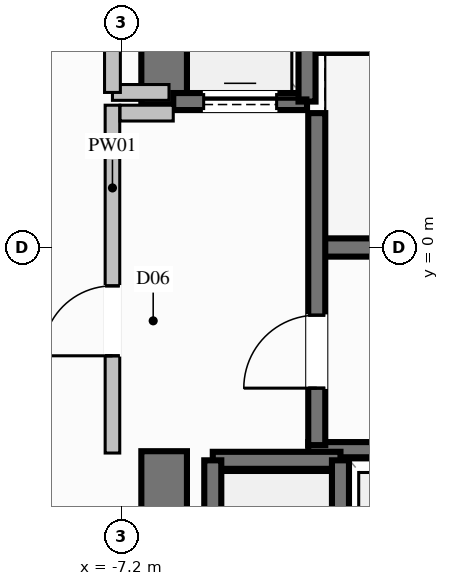
"""IFC4 building model, lengths in metres.
Left out: names, types, materials, properties, quantities, classifications, styles, units other than length and angle.
Written with IfcOpenShell. Run it as: python <this file> out.ifc"""

import sys

from ifc_helpers import new_model, si_unit, direction, frame, frame_2d, origin, place, context, subcontext, project, spatial, rectangle, extrude, element, fill, save


model = new_model("IFC4")
c1 = context("Model", 3, precision=1e-05, world=origin(), true_north=direction((0.0, 1.0)))
c2 = subcontext(c1, "Body", "Model", "MODEL_VIEW")
j1 = project(units=[si_unit("LENGTHUNIT", "METRE"), si_unit("PLANEANGLEUNIT", "RADIAN")], contexts=[c1])
p1 = place(None, origin())
s1 = spatial("IfcSite", under=j1, at=p1, CompositionType="ELEMENT")
p2 = place(p1, origin())
s2 = spatial("IfcBuilding", under=s1, at=p2, CompositionType="ELEMENT")
p3 = place(p2, frame((0.0, 0.0, 75.2)))
s3 = spatial("IfcBuildingStorey", under=s2, at=p3, CompositionType="ELEMENT", Elevation=75.2)
p4 = place(p3, frame((-3.99, 0.0, 0.0), z_axis=(0.0, 0.0, 1.0), x_axis=(1.0, 0.0, 0.0)))
e1 = element("IfcWall", 1, at=p4, inside=s3, PredefinedType="SHEAR", context=c2, shape_type="SweptSolid", body=[
    extrude(rectangle(XDim=7.98, YDim=0.3, at=frame_2d((3.99, 0.0))), origin(), (0.0, 0.0, 1.0), 3.6),
])
for number, where, z_axis, x_axis in (
    (2, (-4.13, -3.325, 0.0), (0.0, 0.0, 1.0), (1.0, 0.0, 0.0)),
    (3, (-4.13, 3.325, 0.0), (0.0, 0.0, 1.0), (1.0, 0.0, 0.0)),
):
    element("IfcWall", number, at=place(p3, frame(where, z_axis=z_axis, x_axis=x_axis)), inside=s3, PredefinedType="SOLIDWALL", context=c2, shape_type="SweptSolid", body=[
        extrude(rectangle(XDim=8.26, YDim=0.25, at=frame_2d((4.13, 0.0))), origin(), (0.0, 0.0, 1.0), 3.6),
    ])
p5 = place(p3, frame((-6.5, 2.35, 0.0), z_axis=(0.0, 0.0, 1.0), x_axis=(0.0, 1.0, 0.0)))
e4 = element("IfcWall", 4, at=p5, inside=s3, PredefinedType="SHEAR", context=c2, shape_type="SweptSolid", body=[
    extrude(rectangle(XDim=4.125, YDim=0.75, at=frame_2d((2.062, 0.0))), origin(), (0.0, 0.0, 1.0), 3.6),
])
p6 = place(p3, frame((-6.5, -6.475, 0.0), z_axis=(0.0, 0.0, 1.0), x_axis=(0.0, 1.0, 0.0)))
e5 = element("IfcWall", 5, at=p6, inside=s3, PredefinedType="SHEAR", context=c2, shape_type="SweptSolid", body=[
    extrude(rectangle(XDim=3.125, YDim=0.75, at=frame_2d((1.562, 0.0))), origin(), (0.0, 0.0, 1.0), 3.6),
])
p7 = place(p3, frame((-3.6, -3.5, 0.0), z_axis=(0.0, 0.0, 1.0), x_axis=(-1.0, 0.0, 0.0)))
e6 = element("IfcWall", 6, at=p7, inside=s3, PredefinedType="SOLIDWALL", context=c2, shape_type="SweptSolid", body=[
    extrude(rectangle(XDim=2.1, YDim=0.28, at=frame_2d((1.05, 0.0))), origin(), (0.0, 0.0, 1.0), 3.34),
])
for number, where, z_axis, x_axis in (
    (7, (-5.7, -3.5, 0.0), (0.0, 0.0, 1.0), (0.0, -1.0, 0.0)),
    (8, (-3.6, -6.0, 0.0), (0.0, 0.0, 1.0), (0.0, 1.0, 0.0)),
):
    element("IfcWall", number, at=place(p3, frame(where, z_axis=z_axis, x_axis=x_axis)), inside=s3, PredefinedType="SOLIDWALL", context=c2, shape_type="SweptSolid", body=[
        extrude(rectangle(XDim=2.5, YDim=0.28, at=frame_2d((1.25, 0.0))), origin(), (0.0, 0.0, 1.0), 3.34),
    ])
p8 = place(p3, frame((-6.35, 2.4, 0.0), z_axis=(0.0, 0.0, 1.0), x_axis=(1.0, 0.0, 0.0)))
e9 = element("IfcWall", 9, at=p8, inside=s3, PredefinedType="SOLIDWALL", context=c2, shape_type="SweptSolid", body=[
    extrude(rectangle(XDim=2.2, YDim=0.28, at=frame_2d((1.1, 0.0))), origin(), (0.0, 0.0, 1.0), 3.34),
])
p9 = place(p8, frame((0.5, 0.0, 0.0)))
e10 = element("IfcOpeningElement", 10, at=p9, cuts=e9, PredefinedType="OPENING", context=c2, shape_type="SweptSolid", body=[
    extrude(rectangle(XDim=1.2, YDim=2.2, at=frame_2d((0.6, 1.1))), frame((0.0, 0.15, 0.0), z_axis=(0.0, -1.0, 0.0), x_axis=(1.0, 0.0, 0.0)), (0.0, 0.0, 1.0), 0.3),
])
p10 = place(p3, frame((-4.15, 2.4, 0.0), z_axis=(0.0, 0.0, 1.0), x_axis=(0.0, 1.0, 0.0)))
e11 = element("IfcWall", 11, at=p10, inside=s3, PredefinedType="SOLIDWALL", context=c2, shape_type="SweptSolid", body=[
    extrude(rectangle(XDim=2.7, YDim=0.28, at=frame_2d((1.35, 0.0))), origin(), (0.0, 0.0, 1.0), 3.34),
])
p11 = place(p3, frame((-3.99, -3.25, 0.0), z_axis=(0.0, 0.0, 1.0), x_axis=(0.0, 1.0, 0.0)))
e12 = element("IfcWall", 12, at=p11, inside=s3, PredefinedType="SOLIDWALL", context=c2, shape_type="SweptSolid", body=[
    extrude(rectangle(XDim=5.46, YDim=0.28, at=frame_2d((2.73, 0.0))), origin(), (0.0, 0.0, 1.0), 3.34),
])
p12 = place(p11, frame((0.937, 0.0, 0.0)))
e13 = element("IfcOpeningElement", 13, at=p12, cuts=e12, PredefinedType="OPENING", context=c2, shape_type="SweptSolid", body=[
    extrude(rectangle(XDim=1.2, YDim=2.2, at=frame_2d((0.6, 1.1))), frame((0.0, 0.15, 0.0), z_axis=(0.0, -1.0, 0.0), x_axis=(1.0, 0.0, 0.0)), (0.0, 0.0, 1.0), 0.3),
])
p13 = place(p3, frame((-7.35, -3.38, 0.0), z_axis=(0.0, 0.0, 1.0), x_axis=(0.0, 1.0, 0.0)))
e14 = element("IfcWall", 14, at=p13, inside=s3, PredefinedType="PARTITIONING", context=c2, shape_type="SweptSolid", body=[
    extrude(rectangle(XDim=5.72, YDim=0.24, at=frame_2d((2.86, 0.0))), origin(), (0.0, 0.0, 1.0), 2.425),
])
p14 = place(p13, frame((1.599, 0.0, 0.0)))
e15 = element("IfcOpeningElement", 15, at=p14, cuts=e14, PredefinedType="OPENING", context=c2, shape_type="SweptSolid", body=[
    extrude(rectangle(XDim=1.15, YDim=2.2, at=frame_2d((0.575, 1.1))), frame((0.0, 0.13, 0.0), z_axis=(0.0, -1.0, 0.0), x_axis=(1.0, 0.0, 0.0)), (0.0, 0.0, 1.0), 0.26),
])
p15 = place(p3, frame((-7.225, 2.21, 0.0), z_axis=(0.0, 0.0, 1.0), x_axis=(1.0, 0.0, 0.0)))
e16 = element("IfcWall", 16, at=p15, inside=s3, PredefinedType="PARTITIONING", context=c2, shape_type="SweptSolid", body=[
    extrude(rectangle(XDim=0.875, YDim=0.26, at=frame_2d((0.438, 0.0))), origin(), (0.0, 0.0, 1.0), 3.34),
])
p16 = place(p3, frame((-7.35, 2.55, 0.0), z_axis=(0.0, 0.0, 1.0), x_axis=(1.0, 0.0, 0.0)))
e17 = element("IfcWall", 17, at=p16, inside=s3, PredefinedType="PARTITIONING", context=c2, shape_type="SweptSolid", body=[
    extrude(rectangle(XDim=0.93, YDim=0.26, at=frame_2d((0.465, 0.0))), origin(), (0.0, 0.0, 1.0), 3.34),
])
p17 = place(p3, frame((-7.35, 2.55, 0.0), z_axis=(0.0, 0.0, 1.0), x_axis=(0.0, 1.0, 0.0)))
e18 = element("IfcWall", 18, at=p17, inside=s3, PredefinedType="PARTITIONING", context=c2, shape_type="SweptSolid", body=[
    extrude(rectangle(XDim=2.4, YDim=0.26, at=frame_2d((1.2, 0.0))), origin(), (0.0, 0.0, 1.0), 2.425),
])
p18 = place(p17, frame((0.775, 0.0, 0.0)))
e19 = element("IfcOpeningElement", 19, at=p18, cuts=e18, PredefinedType="OPENING", context=c2, shape_type="SweptSolid", body=[
    extrude(rectangle(XDim=0.85, YDim=2.05, at=frame_2d((0.425, 1.025))), frame((0.0, 0.14, 0.0), z_axis=(0.0, -1.0, 0.0), x_axis=(1.0, 0.0, 0.0)), (0.0, 0.0, 1.0), 0.28),
])
p19 = place(p9, origin())
e20 = element("IfcDoor", 20, at=p19, inside=s3, OperationType="SLIDING_TO_LEFT", PredefinedType="DOOR", context=c2, shape_type="SweptSolid", body=[
    extrude(rectangle(XDim=1.2, YDim=2.2, at=frame_2d((0.6, 1.1))), frame((0.0, 0.025, 0.0), z_axis=(0.0, -1.0, 0.0), x_axis=(1.0, 0.0, 0.0)), (0.0, 0.0, 1.0), 0.05),
])
fill(e10, e20)
p20 = place(p12, origin())
e21 = element("IfcDoor", 21, at=p20, inside=s3, OperationType="SINGLE_SWING_LEFT", PredefinedType="DOOR", context=c2, shape_type="SweptSolid", body=[
    extrude(rectangle(XDim=1.2, YDim=2.2, at=frame_2d((0.6, 1.1))), frame((0.0, 0.025, 0.0), z_axis=(0.0, -1.0, 0.0), x_axis=(1.0, 0.0, 0.0)), (0.0, 0.0, 1.0), 0.05),
])
fill(e13, e21)
p21 = place(p14, origin())
e22 = element("IfcDoor", 22, at=p21, inside=s3, OperationType="SINGLE_SWING_LEFT", PredefinedType="DOOR", context=c2, shape_type="SweptSolid", body=[
    extrude(rectangle(XDim=1.15, YDim=2.2, at=frame_2d((0.575, 1.1))), frame((0.0, 0.025, 0.0), z_axis=(0.0, -1.0, 0.0), x_axis=(1.0, 0.0, 0.0)), (0.0, 0.0, 1.0), 0.05),
])
fill(e15, e22)
save(model, sys.argv[1])
